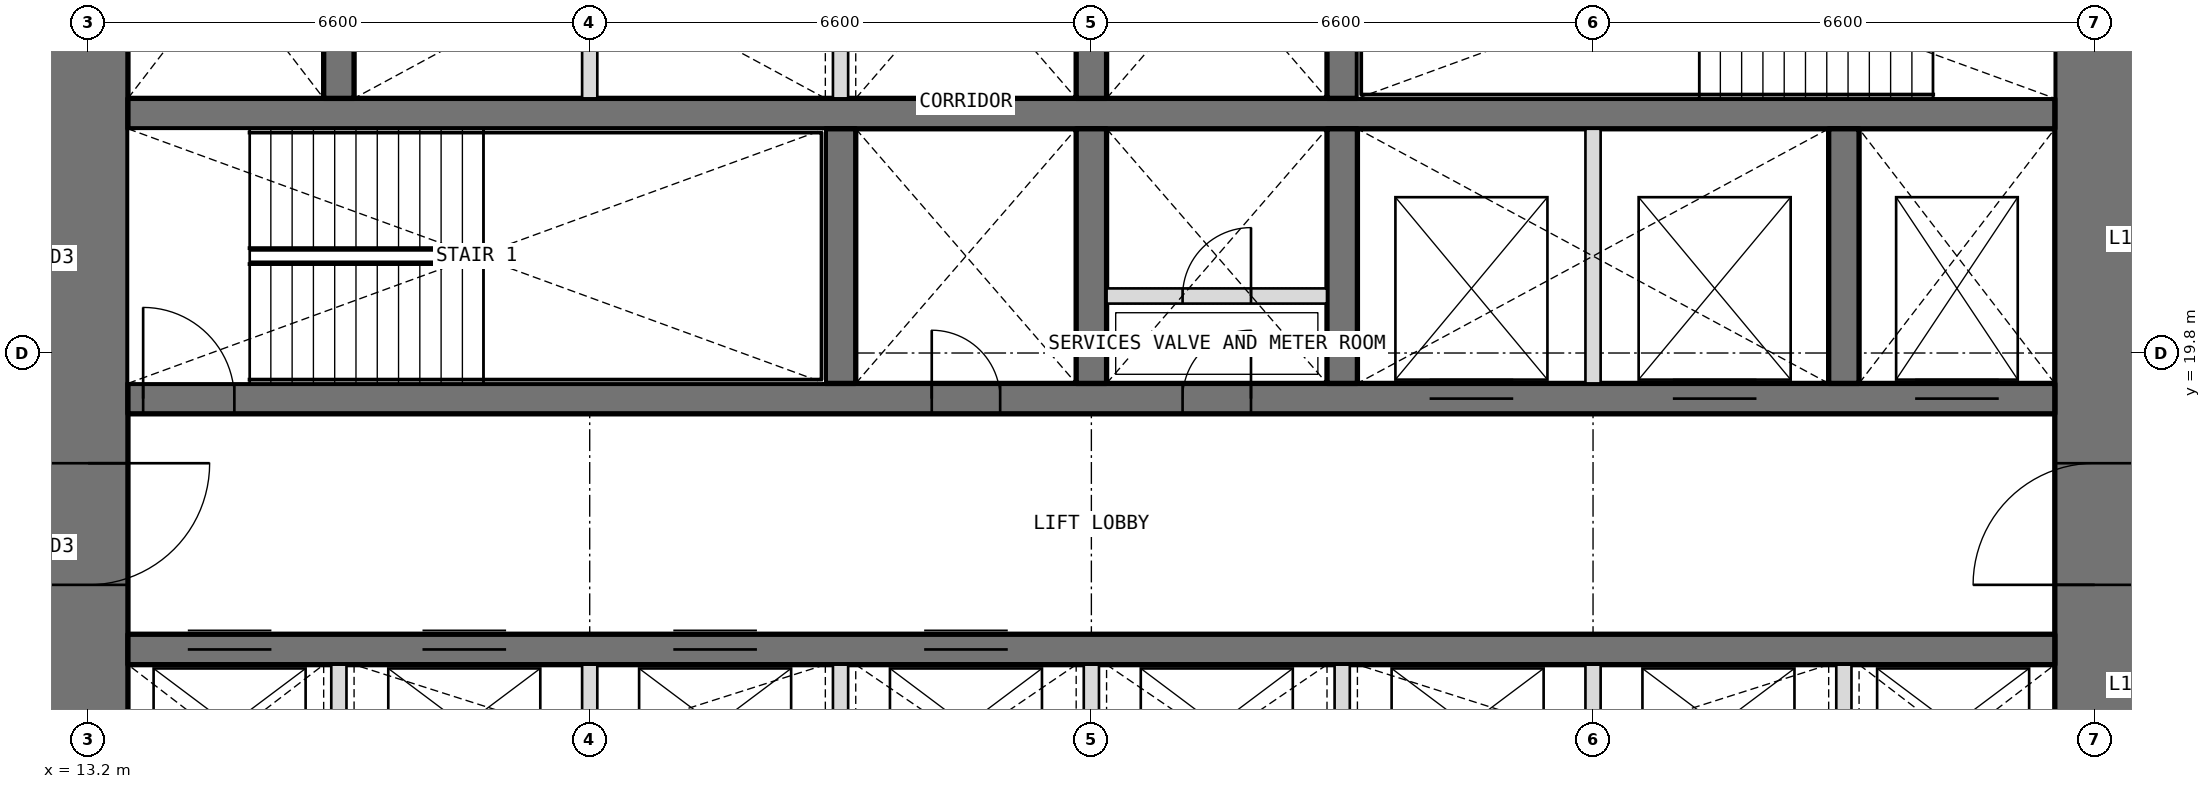
"""IFC4 building model, lengths in metres.
Left out: names, types, materials, properties, quantities, classifications, styles, units other than length and angle.
Written with IfcOpenShell. Run it as: python <this file> out.ifc"""

import sys

from ifc_helpers import new_model, si_unit, direction, frame, frame_2d, origin, place, context, subcontext, project, spatial, rectangle, extrude, element, fill, save


model = new_model("IFC4")
c1 = context("Model", 3, precision=1e-05, world=origin(), true_north=direction((0.0, 1.0)))
c2 = subcontext(c1, "Body", "Model", "MODEL_VIEW")
j1 = project(units=[si_unit("LENGTHUNIT", "METRE"), si_unit("PLANEANGLEUNIT", "RADIAN")], contexts=[c1])
p1 = place(None, origin())
s1 = spatial("IfcSite", under=j1, at=p1, CompositionType="ELEMENT")
p2 = place(p1, origin())
s2 = spatial("IfcBuilding", under=s1, at=p2, CompositionType="ELEMENT")
p3 = place(p2, frame((0.0, 0.0, 46.5)))
s3 = spatial("IfcBuildingStorey", under=s2, at=p3, CompositionType="ELEMENT", Elevation=46.5)
p4 = place(p3, frame((39.6, 13.725, 0.0), z_axis=(0.0, 0.0, 1.0), x_axis=(0.0, 1.0, 0.0)))
e1 = element("IfcWall", 1, at=p4, inside=s3, PredefinedType="SHEAR", context=c2, shape_type="SweptSolid", body=[
    extrude(rectangle(XDim=18.75, YDim=1.05, at=frame_2d((9.375, 0.0))), origin(), (0.0, 0.0, 1.0), 4.2),
])
p5 = place(p4, frame((3.025, 0.0, 0.0)))
e2 = element("IfcOpeningElement", 2, at=p5, cuts=e1, PredefinedType="OPENING", context=c2, shape_type="SweptSolid", body=[
    extrude(rectangle(XDim=1.6, YDim=2.1, at=frame_2d((0.8, 1.05))), frame((0.0, 0.535, 0.0), z_axis=(0.0, -1.0, 0.0), x_axis=(1.0, 0.0, 0.0)), (0.0, 0.0, 1.0), 1.07),
])
p6 = place(p4, frame((13.825, 0.0, 0.0)))
e3 = element("IfcOpeningElement", 3, at=p6, cuts=e1, PredefinedType="OPENING", context=c2, shape_type="SweptSolid", body=[
    extrude(rectangle(XDim=1.6, YDim=2.1, at=frame_2d((0.8, 1.05))), frame((0.0, 0.535, 0.0), z_axis=(0.0, -1.0, 0.0), x_axis=(1.0, 0.0, 0.0)), (0.0, 0.0, 1.0), 1.07),
])
p7 = place(p3, frame((13.2, 32.475, 0.0), z_axis=(0.0, 0.0, 1.0), x_axis=(0.0, -1.0, 0.0)))
e4 = element("IfcWall", 4, at=p7, inside=s3, PredefinedType="SHEAR", context=c2, shape_type="SweptSolid", body=[
    extrude(rectangle(XDim=18.75, YDim=1.05, at=frame_2d((9.375, 0.0))), origin(), (0.0, 0.0, 1.0), 4.2),
])
p8 = place(p7, frame((14.125, 0.0, 0.0)))
e5 = element("IfcOpeningElement", 5, at=p8, cuts=e4, PredefinedType="OPENING", context=c2, shape_type="SweptSolid", body=[
    extrude(rectangle(XDim=1.6, YDim=2.1, at=frame_2d((0.8, 1.05))), frame((0.0, 0.535, 0.0), z_axis=(0.0, -1.0, 0.0), x_axis=(1.0, 0.0, 0.0)), (0.0, 0.0, 1.0), 1.07),
])
p9 = place(p7, frame((3.325, 0.0, 0.0)))
e6 = element("IfcOpeningElement", 6, at=p9, cuts=e4, PredefinedType="OPENING", context=c2, shape_type="SweptSolid", body=[
    extrude(rectangle(XDim=1.6, YDim=2.1, at=frame_2d((0.8, 1.05))), frame((0.0, 0.535, 0.0), z_axis=(0.0, -1.0, 0.0), x_axis=(1.0, 0.0, 0.0)), (0.0, 0.0, 1.0), 1.07),
])
p10 = place(p3, frame((13.725, 15.9, 0.0), z_axis=(0.0, 0.0, 1.0), x_axis=(1.0, 0.0, 0.0)))
e7 = element("IfcWall", 7, at=p10, inside=s3, PredefinedType="SHEAR", context=c2, shape_type="SweptSolid", body=[
    extrude(rectangle(XDim=25.35, YDim=0.4, at=frame_2d((12.675, 0.0))), origin(), (0.0, 0.0, 1.0), 4.2),
])
p11 = place(p10, frame((0.788, 0.0, 0.0)))
e8 = element("IfcOpeningElement", 8, at=p11, cuts=e7, PredefinedType="OPENING", context=c2, shape_type="SweptSolid", body=[
    extrude(rectangle(XDim=1.1, YDim=2.1, at=frame_2d((0.55, 1.05))), frame((0.0, 0.21, 0.0), z_axis=(0.0, -1.0, 0.0), x_axis=(1.0, 0.0, 0.0)), (0.0, 0.0, 1.0), 0.42),
])
p12 = place(p10, frame((3.875, 0.0, 0.0)))
e9 = element("IfcOpeningElement", 9, at=p12, cuts=e7, PredefinedType="OPENING", context=c2, shape_type="SweptSolid", body=[
    extrude(rectangle(XDim=1.1, YDim=2.1, at=frame_2d((0.55, 1.05))), frame((0.0, 0.21, 0.0), z_axis=(0.0, -1.0, 0.0), x_axis=(1.0, 0.0, 0.0)), (0.0, 0.0, 1.0), 0.42),
])
p13 = place(p10, frame((7.175, 0.0, 0.0)))
e10 = element("IfcOpeningElement", 10, at=p13, cuts=e7, PredefinedType="OPENING", context=c2, shape_type="SweptSolid", body=[
    extrude(rectangle(XDim=1.1, YDim=2.1, at=frame_2d((0.55, 1.05))), frame((0.0, 0.21, 0.0), z_axis=(0.0, -1.0, 0.0), x_axis=(1.0, 0.0, 0.0)), (0.0, 0.0, 1.0), 0.42),
])
p14 = place(p10, frame((10.475, 0.0, 0.0)))
e11 = element("IfcOpeningElement", 11, at=p14, cuts=e7, PredefinedType="OPENING", context=c2, shape_type="SweptSolid", body=[
    extrude(rectangle(XDim=1.1, YDim=2.1, at=frame_2d((0.55, 1.05))), frame((0.0, 0.21, 0.0), z_axis=(0.0, -1.0, 0.0), x_axis=(1.0, 0.0, 0.0)), (0.0, 0.0, 1.0), 0.42),
])
p15 = place(p3, frame((13.725, 19.2, 0.0), z_axis=(0.0, 0.0, 1.0), x_axis=(1.0, 0.0, 0.0)))
e12 = element("IfcWall", 12, at=p15, inside=s3, PredefinedType="SHEAR", context=c2, shape_type="SweptSolid", body=[
    extrude(rectangle(XDim=25.35, YDim=0.4, at=frame_2d((12.675, 0.0))), origin(), (0.0, 0.0, 1.0), 4.2),
])
p16 = place(p15, frame((10.575, 0.0, 0.0)))
e13 = element("IfcOpeningElement", 13, at=p16, cuts=e12, PredefinedType="OPENING", context=c2, shape_type="SweptSolid", body=[
    extrude(rectangle(XDim=0.9, YDim=2.1, at=frame_2d((0.45, 1.05))), frame((0.0, 0.21, 0.0), z_axis=(0.0, -1.0, 0.0), x_axis=(1.0, 0.0, 0.0)), (0.0, 0.0, 1.0), 0.42),
])
p17 = place(p15, frame((13.875, 0.0, 0.0)))
e14 = element("IfcOpeningElement", 14, at=p17, cuts=e12, PredefinedType="OPENING", context=c2, shape_type="SweptSolid", body=[
    extrude(rectangle(XDim=0.9, YDim=2.1, at=frame_2d((0.45, 1.05))), frame((0.0, 0.21, 0.0), z_axis=(0.0, -1.0, 0.0), x_axis=(1.0, 0.0, 0.0)), (0.0, 0.0, 1.0), 0.42),
])
p18 = place(p15, frame((0.2, 0.0, 0.0)))
e15 = element("IfcOpeningElement", 15, at=p18, cuts=e12, PredefinedType="OPENING", context=c2, shape_type="SweptSolid", body=[
    extrude(rectangle(XDim=1.2, YDim=2.1, at=frame_2d((0.6, 1.05))), frame((0.0, 0.21, 0.0), z_axis=(0.0, -1.0, 0.0), x_axis=(1.0, 0.0, 0.0)), (0.0, 0.0, 1.0), 0.42),
])
p19 = place(p15, frame((23.512, 0.0, 0.0)))
e16 = element("IfcOpeningElement", 16, at=p19, cuts=e12, PredefinedType="OPENING", context=c2, shape_type="SweptSolid", body=[
    extrude(rectangle(XDim=1.1, YDim=2.1, at=frame_2d((0.55, 1.05))), frame((0.0, 0.21, 0.0), z_axis=(0.0, -1.0, 0.0), x_axis=(1.0, 0.0, 0.0)), (0.0, 0.0, 1.0), 0.42),
])
p20 = place(p15, frame((17.125, 0.0, 0.0)))
e17 = element("IfcOpeningElement", 17, at=p20, cuts=e12, PredefinedType="OPENING", context=c2, shape_type="SweptSolid", body=[
    extrude(rectangle(XDim=1.1, YDim=2.1, at=frame_2d((0.55, 1.05))), frame((0.0, 0.21, 0.0), z_axis=(0.0, -1.0, 0.0), x_axis=(1.0, 0.0, 0.0)), (0.0, 0.0, 1.0), 0.42),
])
p21 = place(p15, frame((20.325, 0.0, 0.0)))
e18 = element("IfcOpeningElement", 18, at=p21, cuts=e12, PredefinedType="OPENING", context=c2, shape_type="SweptSolid", body=[
    extrude(rectangle(XDim=1.1, YDim=2.1, at=frame_2d((0.55, 1.05))), frame((0.0, 0.21, 0.0), z_axis=(0.0, -1.0, 0.0), x_axis=(1.0, 0.0, 0.0)), (0.0, 0.0, 1.0), 0.42),
])
p22 = place(p3, frame((13.725, 22.95, 0.0), z_axis=(0.0, 0.0, 1.0), x_axis=(1.0, 0.0, 0.0)))
e19 = element("IfcWall", 19, at=p22, inside=s3, PredefinedType="SHEAR", context=c2, shape_type="SweptSolid", body=[
    extrude(rectangle(XDim=25.35, YDim=0.4, at=frame_2d((12.675, 0.0))), origin(), (0.0, 0.0, 1.0), 4.2),
])
for number, where, z_axis, x_axis in (
    (20, (23.1, 19.4, 0.0), (0.0, 0.0, 1.0), (0.0, 1.0, 0.0)),
    (21, (26.4, 19.4, 0.0), (0.0, 0.0, 1.0), (0.0, 1.0, 0.0)),
    (22, (29.7, 19.4, 0.0), (0.0, 0.0, 1.0), (0.0, 1.0, 0.0)),
    (23, (36.3, 19.4, 0.0), (0.0, 0.0, 1.0), (0.0, 1.0, 0.0)),
    (24, (16.5, 23.15, 0.0), (0.0, 0.0, 1.0), (0.0, 1.0, 0.0)),
    (25, (26.4, 23.15, 0.0), (0.0, 0.0, 1.0), (0.0, 1.0, 0.0)),
    (26, (29.7, 23.15, 0.0), (0.0, 0.0, 1.0), (0.0, 1.0, 0.0)),
):
    element("IfcWall", number, at=place(p3, frame(where, z_axis=z_axis, x_axis=x_axis)), inside=s3, PredefinedType="SHEAR", context=c2, shape_type="SweptSolid", body=[
        extrude(rectangle(XDim=3.35, YDim=0.4, at=frame_2d((1.675, 0.0))), origin(), (0.0, 0.0, 1.0), 4.2),
    ])
for number, where, z_axis, x_axis in (
    (27, (16.5, 13.725, 0.0), (0.0, 0.0, 1.0), (0.0, 1.0, 0.0)),
    (28, (19.8, 13.725, 0.0), (0.0, 0.0, 1.0), (0.0, 1.0, 0.0)),
    (29, (23.1, 13.725, 0.0), (0.0, 0.0, 1.0), (0.0, 1.0, 0.0)),
    (30, (26.4, 13.725, 0.0), (0.0, 0.0, 1.0), (0.0, 1.0, 0.0)),
    (31, (29.7, 13.725, 0.0), (0.0, 0.0, 1.0), (0.0, 1.0, 0.0)),
    (32, (33.0, 13.725, 0.0), (0.0, 0.0, 1.0), (0.0, 1.0, 0.0)),
    (33, (36.3, 13.725, 0.0), (0.0, 0.0, 1.0), (0.0, 1.0, 0.0)),
):
    element("IfcWall", number, at=place(p3, frame(where, z_axis=z_axis, x_axis=x_axis)), inside=s3, PredefinedType="PARTITIONING", context=c2, shape_type="SweptSolid", body=[
        extrude(rectangle(XDim=1.975, YDim=0.2, at=frame_2d((0.987, 0.0))), origin(), (0.0, 0.0, 1.0), 4.2),
    ])
for number, where, z_axis, x_axis in (
    (34, (33.0, 19.4, 0.0), (0.0, 0.0, 1.0), (0.0, 1.0, 0.0)),
    (35, (19.8, 23.15, 0.0), (0.0, 0.0, 1.0), (0.0, 1.0, 0.0)),
    (36, (23.1, 23.15, 0.0), (0.0, 0.0, 1.0), (0.0, 1.0, 0.0)),
):
    element("IfcWall", number, at=place(p3, frame(where, z_axis=z_axis, x_axis=x_axis)), inside=s3, PredefinedType="PARTITIONING", context=c2, shape_type="SweptSolid", body=[
        extrude(rectangle(XDim=3.35, YDim=0.2, at=frame_2d((1.675, 0.0))), origin(), (0.0, 0.0, 1.0), 4.2),
    ])
p23 = place(p3, frame((26.6, 20.55, 0.0), z_axis=(0.0, 0.0, 1.0), x_axis=(1.0, 0.0, 0.0)))
e37 = element("IfcWall", 37, at=p23, inside=s3, PredefinedType="PARTITIONING", context=c2, shape_type="SweptSolid", body=[
    extrude(rectangle(XDim=2.9, YDim=0.2, at=frame_2d((1.45, 0.0))), origin(), (0.0, 0.0, 1.0), 3.9),
])
p24 = place(p23, frame((1.0, 0.0, 0.0)))
e38 = element("IfcOpeningElement", 38, at=p24, cuts=e37, PredefinedType="OPENING", context=c2, shape_type="SweptSolid", body=[
    extrude(rectangle(XDim=0.9, YDim=2.1, at=frame_2d((0.45, 1.05))), frame((0.0, 0.11, 0.0), z_axis=(0.0, -1.0, 0.0), x_axis=(1.0, 0.0, 0.0)), (0.0, 0.0, 1.0), 0.22),
])
p25 = place(p16, origin())
e39 = element("IfcDoor", 39, at=p25, inside=s3, OperationType="SINGLE_SWING_LEFT", PredefinedType="DOOR", context=c2, shape_type="SweptSolid", body=[
    extrude(rectangle(XDim=0.9, YDim=2.1, at=frame_2d((0.45, 1.05))), frame((0.0, 0.025, 0.0), z_axis=(0.0, -1.0, 0.0), x_axis=(1.0, 0.0, 0.0)), (0.0, 0.0, 1.0), 0.05),
])
fill(e13, e39)
p26 = place(p17, origin())
e40 = element("IfcDoor", 40, at=p26, inside=s3, OperationType="SINGLE_SWING_RIGHT", PredefinedType="DOOR", context=c2, shape_type="SweptSolid", body=[
    extrude(rectangle(XDim=0.9, YDim=2.1, at=frame_2d((0.45, 1.05))), frame((0.0, 0.025, 0.0), z_axis=(0.0, -1.0, 0.0), x_axis=(1.0, 0.0, 0.0)), (0.0, 0.0, 1.0), 0.05),
])
fill(e14, e40)
p27 = place(p24, origin())
e41 = element("IfcDoor", 41, at=p27, inside=s3, OperationType="SINGLE_SWING_RIGHT", PredefinedType="DOOR", context=c2, shape_type="SweptSolid", body=[
    extrude(rectangle(XDim=0.9, YDim=2.1, at=frame_2d((0.45, 1.05))), frame((0.0, 0.025, 0.0), z_axis=(0.0, -1.0, 0.0), x_axis=(1.0, 0.0, 0.0)), (0.0, 0.0, 1.0), 0.05),
])
fill(e38, e41)
p28 = place(p18, origin())
e42 = element("IfcDoor", 42, at=p28, inside=s3, OperationType="SINGLE_SWING_LEFT", PredefinedType="DOOR", context=c2, shape_type="SweptSolid", body=[
    extrude(rectangle(XDim=1.2, YDim=2.1, at=frame_2d((0.6, 1.05))), frame((0.0, 0.025, 0.0), z_axis=(0.0, -1.0, 0.0), x_axis=(1.0, 0.0, 0.0)), (0.0, 0.0, 1.0), 0.05),
])
fill(e15, e42)
p29 = place(p8, origin())
e43 = element("IfcDoor", 43, at=p29, inside=s3, OperationType="DOUBLE_DOOR_DOUBLE_SWING", PredefinedType="DOOR", context=c2, shape_type="SweptSolid", body=[
    extrude(rectangle(XDim=1.6, YDim=2.1, at=frame_2d((0.8, 1.05))), frame((0.0, 0.025, 0.0), z_axis=(0.0, -1.0, 0.0), x_axis=(1.0, 0.0, 0.0)), (0.0, 0.0, 1.0), 0.05),
])
fill(e5, e43)
p30 = place(p5, origin())
e44 = element("IfcDoor", 44, at=p30, inside=s3, OperationType="DOUBLE_DOOR_DOUBLE_SWING", PredefinedType="DOOR", context=c2, shape_type="SweptSolid", body=[
    extrude(rectangle(XDim=1.6, YDim=2.1, at=frame_2d((0.8, 1.05))), frame((0.0, 0.025, 0.0), z_axis=(0.0, -1.0, 0.0), x_axis=(1.0, 0.0, 0.0)), (0.0, 0.0, 1.0), 0.05),
])
fill(e2, e44)
p31 = place(p11, origin())
e45 = element("IfcDoor", 45, at=p31, inside=s3, OperationType="DOUBLE_DOOR_SLIDING", PredefinedType="DOOR", context=c2, shape_type="SweptSolid", body=[
    extrude(rectangle(XDim=1.1, YDim=2.1, at=frame_2d((0.55, 1.05))), frame((0.0, 0.025, 0.0), z_axis=(0.0, -1.0, 0.0), x_axis=(1.0, 0.0, 0.0)), (0.0, 0.0, 1.0), 0.05),
])
fill(e8, e45)
p32 = place(p12, origin())
e46 = element("IfcDoor", 46, at=p32, inside=s3, OperationType="DOUBLE_DOOR_SLIDING", PredefinedType="DOOR", context=c2, shape_type="SweptSolid", body=[
    extrude(rectangle(XDim=1.1, YDim=2.1, at=frame_2d((0.55, 1.05))), frame((0.0, 0.025, 0.0), z_axis=(0.0, -1.0, 0.0), x_axis=(1.0, 0.0, 0.0)), (0.0, 0.0, 1.0), 0.05),
])
fill(e9, e46)
p33 = place(p13, origin())
e47 = element("IfcDoor", 47, at=p33, inside=s3, OperationType="DOUBLE_DOOR_SLIDING", PredefinedType="DOOR", context=c2, shape_type="SweptSolid", body=[
    extrude(rectangle(XDim=1.1, YDim=2.1, at=frame_2d((0.55, 1.05))), frame((0.0, 0.025, 0.0), z_axis=(0.0, -1.0, 0.0), x_axis=(1.0, 0.0, 0.0)), (0.0, 0.0, 1.0), 0.05),
])
fill(e10, e47)
p34 = place(p14, origin())
e48 = element("IfcDoor", 48, at=p34, inside=s3, OperationType="DOUBLE_DOOR_SLIDING", PredefinedType="DOOR", context=c2, shape_type="SweptSolid", body=[
    extrude(rectangle(XDim=1.1, YDim=2.1, at=frame_2d((0.55, 1.05))), frame((0.0, 0.025, 0.0), z_axis=(0.0, -1.0, 0.0), x_axis=(1.0, 0.0, 0.0)), (0.0, 0.0, 1.0), 0.05),
])
fill(e11, e48)
p35 = place(p19, origin())
e49 = element("IfcDoor", 49, at=p35, inside=s3, OperationType="DOUBLE_DOOR_SLIDING", PredefinedType="DOOR", context=c2, shape_type="SweptSolid", body=[
    extrude(rectangle(XDim=1.1, YDim=2.1, at=frame_2d((0.55, 1.05))), frame((0.0, 0.025, 0.0), z_axis=(0.0, -1.0, 0.0), x_axis=(1.0, 0.0, 0.0)), (0.0, 0.0, 1.0), 0.05),
])
fill(e16, e49)
p36 = place(p20, origin())
e50 = element("IfcDoor", 50, at=p36, inside=s3, OperationType="DOUBLE_DOOR_SLIDING", PredefinedType="DOOR", context=c2, shape_type="SweptSolid", body=[
    extrude(rectangle(XDim=1.1, YDim=2.1, at=frame_2d((0.55, 1.05))), frame((0.0, 0.025, 0.0), z_axis=(0.0, -1.0, 0.0), x_axis=(1.0, 0.0, 0.0)), (0.0, 0.0, 1.0), 0.05),
])
fill(e17, e50)
p37 = place(p21, origin())
e51 = element("IfcDoor", 51, at=p37, inside=s3, OperationType="DOUBLE_DOOR_SLIDING", PredefinedType="DOOR", context=c2, shape_type="SweptSolid", body=[
    extrude(rectangle(XDim=1.1, YDim=2.1, at=frame_2d((0.55, 1.05))), frame((0.0, 0.025, 0.0), z_axis=(0.0, -1.0, 0.0), x_axis=(1.0, 0.0, 0.0)), (0.0, 0.0, 1.0), 0.05),
])
fill(e18, e51)
save(model, sys.argv[1])
